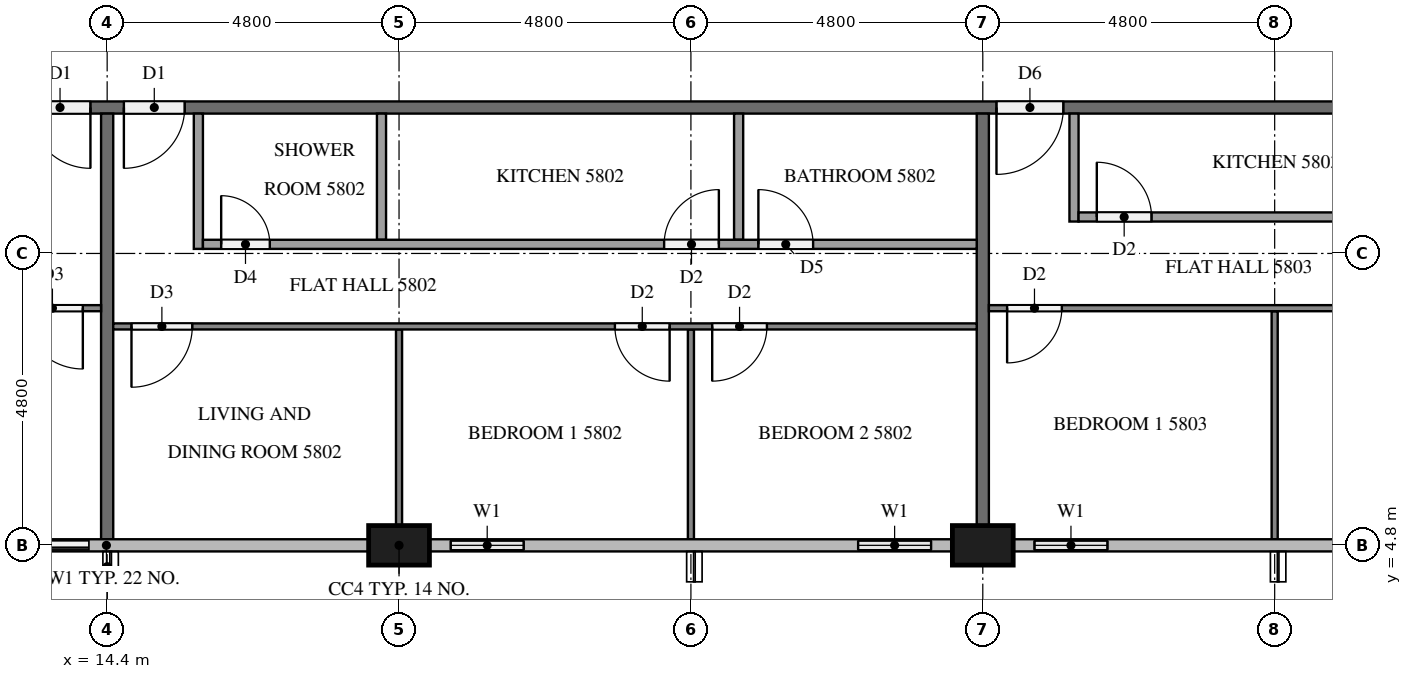
"""IFC4 building model, lengths in metres.
Left out: names, types, materials, properties, quantities, classifications, styles, units other than length and angle.
Written with IfcOpenShell. Run it as: python <this file> out.ifc"""

import sys

from ifc_helpers import new_model, si_unit, direction, frame, frame_2d, origin, origin_2d, place, context, subcontext, project, spatial, rectangle, extrude, element, fill, save


model = new_model("IFC4")
c1 = context("Model", 3, precision=1e-05, world=origin(), true_north=direction((0.0, 1.0)))
c2 = subcontext(c1, "Body", "Model", "MODEL_VIEW")
j1 = project(units=[si_unit("LENGTHUNIT", "METRE"), si_unit("PLANEANGLEUNIT", "RADIAN")], contexts=[c1])
p1 = place(None, origin())
s1 = spatial("IfcSite", under=j1, at=p1, CompositionType="ELEMENT")
p2 = place(p1, origin())
s2 = spatial("IfcBuilding", under=s1, at=p2, CompositionType="ELEMENT")
p3 = place(p2, frame((0.0, 0.0, 222.8)))
s3 = spatial("IfcBuildingStorey", under=s2, at=p3, CompositionType="ELEMENT", Elevation=222.8)
for number, where, z_axis, x_axis in (
    (1, (19.2, 4.8, 0.0), (0.0, 0.0, 1.0), (1.0, 0.0, 0.0)),
    (2, (28.8, 4.8, 0.0), (0.0, 0.0, 1.0), (1.0, 0.0, 0.0)),
):
    element("IfcColumn", number, at=place(p3, frame(where, z_axis=z_axis, x_axis=x_axis)), inside=s3, PredefinedType="COLUMN", context=c2, shape_type="SweptSolid", body=[
        extrude(rectangle(XDim=1.0, YDim=0.65, at=origin_2d()), origin(), (0.0, 0.0, 1.0), 3.2),
    ])
p4 = place(p3, frame((12.0, 4.8, 0.0), z_axis=(0.0, 0.0, 1.0), x_axis=(1.0, 0.0, 0.0)))
e3 = element("IfcWall", 3, at=p4, inside=s3, PredefinedType="SOLIDWALL", context=c2, shape_type="SweptSolid", body=[
    extrude(rectangle(XDim=2.4, YDim=0.15, at=frame_2d((1.2, 0.0))), origin(), (0.0, 0.0, 1.0), 3.2),
])
p5 = place(p4, frame((0.3, 0.0, 0.0)))
e4 = element("IfcOpeningElement", 4, at=p5, cuts=e3, PredefinedType="OPENING", context=c2, shape_type="SweptSolid", body=[
    extrude(rectangle(XDim=1.8, YDim=2.4, at=frame_2d((0.9, 1.2))), frame((0.0, 0.085, 0.0), z_axis=(0.0, -1.0, 0.0), x_axis=(1.0, 0.0, 0.0)), (0.0, 0.0, 1.0), 0.17),
])
p6 = place(p3, frame((19.7, 4.8, 0.0), z_axis=(0.0, 0.0, 1.0), x_axis=(1.0, 0.0, 0.0)))
e5 = element("IfcWall", 5, at=p6, inside=s3, PredefinedType="SOLIDWALL", context=c2, shape_type="SweptSolid", body=[
    extrude(rectangle(XDim=1.9, YDim=0.15, at=frame_2d((0.95, 0.0))), origin(), (0.0, 0.0, 1.0), 3.2),
])
p7 = place(p6, frame((0.35, 0.0, 0.9)))
e6 = element("IfcOpeningElement", 6, at=p7, cuts=e5, PredefinedType="OPENING", context=c2, shape_type="SweptSolid", body=[
    extrude(rectangle(XDim=1.2, YDim=1.4, at=frame_2d((0.6, 0.7))), frame((0.0, 0.085, 0.0), z_axis=(0.0, -1.0, 0.0), x_axis=(1.0, 0.0, 0.0)), (0.0, 0.0, 1.0), 0.17),
])
p8 = place(p3, frame((26.4, 4.8, 0.0), z_axis=(0.0, 0.0, 1.0), x_axis=(1.0, 0.0, 0.0)))
e7 = element("IfcWall", 7, at=p8, inside=s3, PredefinedType="SOLIDWALL", context=c2, shape_type="SweptSolid", body=[
    extrude(rectangle(XDim=1.9, YDim=0.15, at=frame_2d((0.95, 0.0))), origin(), (0.0, 0.0, 1.0), 3.2),
])
p9 = place(p8, frame((0.35, 0.0, 0.9)))
e8 = element("IfcOpeningElement", 8, at=p9, cuts=e7, PredefinedType="OPENING", context=c2, shape_type="SweptSolid", body=[
    extrude(rectangle(XDim=1.2, YDim=1.4, at=frame_2d((0.6, 0.7))), frame((0.0, 0.085, 0.0), z_axis=(0.0, -1.0, 0.0), x_axis=(1.0, 0.0, 0.0)), (0.0, 0.0, 1.0), 0.17),
])
p10 = place(p3, frame((29.3, 4.8, 0.0), z_axis=(0.0, 0.0, 1.0), x_axis=(1.0, 0.0, 0.0)))
e9 = element("IfcWall", 9, at=p10, inside=s3, PredefinedType="SOLIDWALL", context=c2, shape_type="SweptSolid", body=[
    extrude(rectangle(XDim=1.9, YDim=0.15, at=frame_2d((0.95, 0.0))), origin(), (0.0, 0.0, 1.0), 3.2),
])
p11 = place(p10, frame((0.35, 0.0, 0.9)))
e10 = element("IfcOpeningElement", 10, at=p11, cuts=e9, PredefinedType="OPENING", context=c2, shape_type="SweptSolid", body=[
    extrude(rectangle(XDim=1.2, YDim=1.4, at=frame_2d((0.6, 0.7))), frame((0.0, 0.085, 0.0), z_axis=(0.0, -1.0, 0.0), x_axis=(1.0, 0.0, 0.0)), (0.0, 0.0, 1.0), 0.17),
])
p12 = place(p3, frame((50.5, 12.0, 0.0), z_axis=(0.0, 0.0, 1.0), x_axis=(-1.0, 0.0, 0.0)))
e11 = element("IfcWall", 11, at=p12, inside=s3, PredefinedType="PARTITIONING", context=c2, shape_type="SweptSolid", body=[
    extrude(rectangle(XDim=38.6, YDim=0.2, at=frame_2d((19.3, 0.0))), origin(), (0.0, 0.0, 1.0), 3.2),
])
p13 = place(p12, frame((36.375, 0.0, 0.0)))
e12 = element("IfcOpeningElement", 12, at=p13, cuts=e11, PredefinedType="OPENING", context=c2, shape_type="SweptSolid", body=[
    extrude(rectangle(XDim=1.0, YDim=2.1, at=frame_2d((0.5, 1.05))), frame((0.0, 0.11, 0.0), z_axis=(0.0, -1.0, 0.0), x_axis=(1.0, 0.0, 0.0)), (0.0, 0.0, 1.0), 0.22),
])
p14 = place(p12, frame((34.825, 0.0, 0.0)))
e13 = element("IfcOpeningElement", 13, at=p14, cuts=e11, PredefinedType="OPENING", context=c2, shape_type="SweptSolid", body=[
    extrude(rectangle(XDim=1.0, YDim=2.1, at=frame_2d((0.5, 1.05))), frame((0.0, 0.11, 0.0), z_axis=(0.0, -1.0, 0.0), x_axis=(1.0, 0.0, 0.0)), (0.0, 0.0, 1.0), 0.22),
])
p15 = place(p12, frame((20.375, 0.0, 0.0)))
e14 = element("IfcOpeningElement", 14, at=p15, cuts=e11, PredefinedType="OPENING", context=c2, shape_type="SweptSolid", body=[
    extrude(rectangle(XDim=1.1, YDim=2.1, at=frame_2d((0.55, 1.05))), frame((0.0, 0.11, 0.0), z_axis=(0.0, -1.0, 0.0), x_axis=(1.0, 0.0, 0.0)), (0.0, 0.0, 1.0), 0.22),
])
p16 = place(p12, frame((1.225, 0.0, 0.0)))
e15 = element("IfcOpeningElement", 15, at=p16, cuts=e11, PredefinedType="OPENING", context=c2, shape_type="SweptSolid", body=[
    extrude(rectangle(XDim=1.0, YDim=2.1, at=frame_2d((0.5, 1.05))), frame((0.0, 0.11, 0.0), z_axis=(0.0, -1.0, 0.0), x_axis=(1.0, 0.0, 0.0)), (0.0, 0.0, 1.0), 0.22),
])
p17 = place(p3, frame((14.4, 11.9, 0.0), z_axis=(0.0, 0.0, 1.0), x_axis=(0.0, -1.0, 0.0)))
e16 = element("IfcWall", 16, at=p17, inside=s3, PredefinedType="PARTITIONING", context=c2, shape_type="SweptSolid", body=[
    extrude(rectangle(XDim=7.0, YDim=0.2, at=frame_2d((3.5, 0.0))), origin(), (0.0, 0.0, 1.0), 3.2),
])
p18 = place(p3, frame((28.8, 11.9, 0.0), z_axis=(0.0, 0.0, 1.0), x_axis=(0.0, -1.0, 0.0)))
e17 = element("IfcWall", 17, at=p18, inside=s3, PredefinedType="PARTITIONING", context=c2, shape_type="SweptSolid", body=[
    extrude(rectangle(XDim=6.775, YDim=0.2, at=frame_2d((3.387, 0.0))), origin(), (0.0, 0.0, 1.0), 3.2),
])
p19 = place(p3, frame((14.3, 8.7, 0.0), z_axis=(0.0, 0.0, 1.0), x_axis=(-1.0, 0.0, 0.0)))
e18 = element("IfcWall", 18, at=p19, inside=s3, PredefinedType="PARTITIONING", context=c2, shape_type="SweptSolid", body=[
    extrude(rectangle(XDim=9.159, YDim=0.1, at=frame_2d((4.58, 0.0))), origin(), (0.0, 0.0, 1.0), 3.2),
])
p20 = place(p19, frame((0.3, 0.0, 0.0)))
e19 = element("IfcOpeningElement", 19, at=p20, cuts=e18, PredefinedType="OPENING", context=c2, shape_type="SweptSolid", body=[
    extrude(rectangle(XDim=1.0, YDim=2.1, at=frame_2d((0.5, 1.05))), frame((0.0, 0.06, 0.0), z_axis=(0.0, -1.0, 0.0), x_axis=(1.0, 0.0, 0.0)), (0.0, 0.0, 1.0), 0.12),
])
p21 = place(p19, frame((7.959, 0.0, 0.0)))
e20 = element("IfcOpeningElement", 20, at=p21, cuts=e18, PredefinedType="OPENING", context=c2, shape_type="SweptSolid", body=[
    extrude(rectangle(XDim=0.9, YDim=2.1, at=frame_2d((0.45, 1.05))), frame((0.0, 0.06, 0.0), z_axis=(0.0, -1.0, 0.0), x_axis=(1.0, 0.0, 0.0)), (0.0, 0.0, 1.0), 0.12),
])
p22 = place(p3, frame((19.2, 8.35, 0.0), z_axis=(0.0, 0.0, 1.0), x_axis=(0.0, -1.0, 0.0)))
e21 = element("IfcWall", 21, at=p22, inside=s3, PredefinedType="PARTITIONING", context=c2, shape_type="SweptSolid", body=[
    extrude(rectangle(XDim=3.225, YDim=0.1, at=frame_2d((1.613, 0.0))), origin(), (0.0, 0.0, 1.0), 3.2),
])
p23 = place(p3, frame((24.0, 8.35, 0.0), z_axis=(0.0, 0.0, 1.0), x_axis=(0.0, -1.0, 0.0)))
e22 = element("IfcWall", 22, at=p23, inside=s3, PredefinedType="PARTITIONING", context=c2, shape_type="SweptSolid", body=[
    extrude(rectangle(XDim=3.45, YDim=0.1, at=frame_2d((1.725, 0.0))), origin(), (0.0, 0.0, 1.0), 3.2),
])
p24 = place(p3, frame((28.7, 8.4, 0.0), z_axis=(0.0, 0.0, 1.0), x_axis=(-1.0, 0.0, 0.0)))
e23 = element("IfcWall", 23, at=p24, inside=s3, PredefinedType="PARTITIONING", context=c2, shape_type="SweptSolid", body=[
    extrude(rectangle(XDim=14.2, YDim=0.1, at=frame_2d((7.1, 0.0))), origin(), (0.0, 0.0, 1.0), 3.2),
])
p25 = place(p24, frame((12.9, 0.0, 0.0)))
e24 = element("IfcOpeningElement", 24, at=p25, cuts=e23, PredefinedType="OPENING", context=c2, shape_type="SweptSolid", body=[
    extrude(rectangle(XDim=1.0, YDim=2.1, at=frame_2d((0.5, 1.05))), frame((0.0, 0.06, 0.0), z_axis=(0.0, -1.0, 0.0), x_axis=(1.0, 0.0, 0.0)), (0.0, 0.0, 1.0), 0.12),
])
p26 = place(p24, frame((5.05, 0.0, 0.0)))
e25 = element("IfcOpeningElement", 25, at=p26, cuts=e23, PredefinedType="OPENING", context=c2, shape_type="SweptSolid", body=[
    extrude(rectangle(XDim=0.9, YDim=2.1, at=frame_2d((0.45, 1.05))), frame((0.0, 0.06, 0.0), z_axis=(0.0, -1.0, 0.0), x_axis=(1.0, 0.0, 0.0)), (0.0, 0.0, 1.0), 0.12),
])
p27 = place(p24, frame((3.45, 0.0, 0.0)))
e26 = element("IfcOpeningElement", 26, at=p27, cuts=e23, PredefinedType="OPENING", context=c2, shape_type="SweptSolid", body=[
    extrude(rectangle(XDim=0.9, YDim=2.1, at=frame_2d((0.45, 1.05))), frame((0.0, 0.06, 0.0), z_axis=(0.0, -1.0, 0.0), x_axis=(1.0, 0.0, 0.0)), (0.0, 0.0, 1.0), 0.12),
])
for number, where, z_axis, x_axis in (
    (27, (18.912, 11.9, 0.0), (0.0, 0.0, 1.0), (0.0, -1.0, 0.0)),
    (28, (24.785, 11.9, 0.0), (0.0, 0.0, 1.0), (0.0, -1.0, 0.0)),
):
    element("IfcWall", number, at=place(p3, frame(where, z_axis=z_axis, x_axis=x_axis)), inside=s3, PredefinedType="PARTITIONING", context=c2, shape_type="SweptSolid", body=[
        extrude(rectangle(XDim=2.075, YDim=0.15, at=frame_2d((1.038, 0.0))), origin(), (0.0, 0.0, 1.0), 3.2),
    ])
p28 = place(p3, frame((15.9, 11.9, 0.0), z_axis=(0.0, 0.0, 1.0), x_axis=(0.0, -1.0, 0.0)))
e29 = element("IfcWall", 29, at=p28, inside=s3, PredefinedType="PARTITIONING", context=c2, shape_type="SweptSolid", body=[
    extrude(rectangle(XDim=2.225, YDim=0.15, at=frame_2d((1.112, 0.0))), origin(), (0.0, 0.0, 1.0), 3.2),
])
p29 = place(p3, frame((15.975, 9.75, 0.0), z_axis=(0.0, 0.0, 1.0), x_axis=(1.0, 0.0, 0.0)))
e30 = element("IfcWall", 30, at=p29, inside=s3, PredefinedType="PARTITIONING", context=c2, shape_type="SweptSolid", body=[
    extrude(rectangle(XDim=12.725, YDim=0.15, at=frame_2d((6.362, 0.0))), origin(), (0.0, 0.0, 1.0), 3.2),
])
p30 = place(p29, frame((0.3, 0.0, 0.0)))
e31 = element("IfcOpeningElement", 31, at=p30, cuts=e30, PredefinedType="OPENING", context=c2, shape_type="SweptSolid", body=[
    extrude(rectangle(XDim=0.8, YDim=2.1, at=frame_2d((0.4, 1.05))), frame((0.0, 0.085, 0.0), z_axis=(0.0, -1.0, 0.0), x_axis=(1.0, 0.0, 0.0)), (0.0, 0.0, 1.0), 0.17),
])
p31 = place(p29, frame((7.585, 0.0, 0.0)))
e32 = element("IfcOpeningElement", 32, at=p31, cuts=e30, PredefinedType="OPENING", context=c2, shape_type="SweptSolid", body=[
    extrude(rectangle(XDim=0.9, YDim=2.1, at=frame_2d((0.45, 1.05))), frame((0.0, 0.085, 0.0), z_axis=(0.0, -1.0, 0.0), x_axis=(1.0, 0.0, 0.0)), (0.0, 0.0, 1.0), 0.17),
])
p32 = place(p29, frame((9.135, 0.0, 0.0)))
e33 = element("IfcOpeningElement", 33, at=p32, cuts=e30, PredefinedType="OPENING", context=c2, shape_type="SweptSolid", body=[
    extrude(rectangle(XDim=0.9, YDim=2.1, at=frame_2d((0.45, 1.05))), frame((0.0, 0.085, 0.0), z_axis=(0.0, -1.0, 0.0), x_axis=(1.0, 0.0, 0.0)), (0.0, 0.0, 1.0), 0.17),
])
p33 = place(p3, frame((33.6, 8.65, 0.0), z_axis=(0.0, 0.0, 1.0), x_axis=(0.0, -1.0, 0.0)))
e34 = element("IfcWall", 34, at=p33, inside=s3, PredefinedType="PARTITIONING", context=c2, shape_type="SweptSolid", body=[
    extrude(rectangle(XDim=3.75, YDim=0.1, at=frame_2d((1.875, 0.0))), origin(), (0.0, 0.0, 1.0), 3.2),
])
p34 = place(p3, frame((47.9, 8.7, 0.0), z_axis=(0.0, 0.0, 1.0), x_axis=(-1.0, 0.0, 0.0)))
e35 = element("IfcWall", 35, at=p34, inside=s3, PredefinedType="PARTITIONING", context=c2, shape_type="SweptSolid", body=[
    extrude(rectangle(XDim=19.0, YDim=0.1, at=frame_2d((9.5, 0.0))), origin(), (0.0, 0.0, 1.0), 3.2),
])
p35 = place(p34, frame((17.8, 0.0, 0.0)))
e36 = element("IfcOpeningElement", 36, at=p35, cuts=e35, PredefinedType="OPENING", context=c2, shape_type="SweptSolid", body=[
    extrude(rectangle(XDim=0.9, YDim=2.1, at=frame_2d((0.45, 1.05))), frame((0.0, 0.06, 0.0), z_axis=(0.0, -1.0, 0.0), x_axis=(1.0, 0.0, 0.0)), (0.0, 0.0, 1.0), 0.12),
])
p36 = place(p34, frame((9.85, 0.0, 0.0)))
e37 = element("IfcOpeningElement", 37, at=p36, cuts=e35, PredefinedType="OPENING", context=c2, shape_type="SweptSolid", body=[
    extrude(rectangle(XDim=0.9, YDim=2.1, at=frame_2d((0.45, 1.05))), frame((0.0, 0.06, 0.0), z_axis=(0.0, -1.0, 0.0), x_axis=(1.0, 0.0, 0.0)), (0.0, 0.0, 1.0), 0.12),
])
p37 = place(p34, frame((8.25, 0.0, 0.0)))
e38 = element("IfcOpeningElement", 38, at=p37, cuts=e35, PredefinedType="OPENING", context=c2, shape_type="SweptSolid", body=[
    extrude(rectangle(XDim=0.9, YDim=2.1, at=frame_2d((0.45, 1.05))), frame((0.0, 0.06, 0.0), z_axis=(0.0, -1.0, 0.0), x_axis=(1.0, 0.0, 0.0)), (0.0, 0.0, 1.0), 0.12),
])
p38 = place(p34, frame((0.3, 0.0, 0.0)))
e39 = element("IfcOpeningElement", 39, at=p38, cuts=e35, PredefinedType="OPENING", context=c2, shape_type="SweptSolid", body=[
    extrude(rectangle(XDim=1.0, YDim=2.1, at=frame_2d((0.5, 1.05))), frame((0.0, 0.06, 0.0), z_axis=(0.0, -1.0, 0.0), x_axis=(1.0, 0.0, 0.0)), (0.0, 0.0, 1.0), 0.12),
])
p39 = place(p3, frame((30.3, 11.9, 0.0), z_axis=(0.0, 0.0, 1.0), x_axis=(0.0, -1.0, 0.0)))
e40 = element("IfcWall", 40, at=p39, inside=s3, PredefinedType="PARTITIONING", context=c2, shape_type="SweptSolid", body=[
    extrude(rectangle(XDim=1.775, YDim=0.15, at=frame_2d((0.887, 0.0))), origin(), (0.0, 0.0, 1.0), 3.2),
])
p40 = place(p3, frame((30.375, 10.2, 0.0), z_axis=(0.0, 0.0, 1.0), x_axis=(1.0, 0.0, 0.0)))
e41 = element("IfcWall", 41, at=p40, inside=s3, PredefinedType="PARTITIONING", context=c2, shape_type="SweptSolid", body=[
    extrude(rectangle(XDim=17.525, YDim=0.15, at=frame_2d((8.762, 0.0))), origin(), (0.0, 0.0, 1.0), 3.2),
])
p41 = place(p40, frame((0.3, 0.0, 0.0)))
e42 = element("IfcOpeningElement", 42, at=p41, cuts=e41, PredefinedType="OPENING", context=c2, shape_type="SweptSolid", body=[
    extrude(rectangle(XDim=0.9, YDim=2.1, at=frame_2d((0.45, 1.05))), frame((0.0, 0.085, 0.0), z_axis=(0.0, -1.0, 0.0), x_axis=(1.0, 0.0, 0.0)), (0.0, 0.0, 1.0), 0.17),
])
p42 = place(p40, frame((8.733, 0.0, 0.0)))
e43 = element("IfcOpeningElement", 43, at=p42, cuts=e41, PredefinedType="OPENING", context=c2, shape_type="SweptSolid", body=[
    extrude(rectangle(XDim=0.8, YDim=2.1, at=frame_2d((0.4, 1.05))), frame((0.0, 0.085, 0.0), z_axis=(0.0, -1.0, 0.0), x_axis=(1.0, 0.0, 0.0)), (0.0, 0.0, 1.0), 0.17),
])
p43 = place(p40, frame((10.183, 0.0, 0.0)))
e44 = element("IfcOpeningElement", 44, at=p43, cuts=e41, PredefinedType="OPENING", context=c2, shape_type="SweptSolid", body=[
    extrude(rectangle(XDim=0.8, YDim=2.1, at=frame_2d((0.4, 1.05))), frame((0.0, 0.085, 0.0), z_axis=(0.0, -1.0, 0.0), x_axis=(1.0, 0.0, 0.0)), (0.0, 0.0, 1.0), 0.17),
])
p44 = place(p40, frame((16.275, 0.0, 0.0)))
e45 = element("IfcOpeningElement", 45, at=p44, cuts=e41, PredefinedType="OPENING", context=c2, shape_type="SweptSolid", body=[
    extrude(rectangle(XDim=0.9, YDim=2.1, at=frame_2d((0.45, 1.05))), frame((0.0, 0.085, 0.0), z_axis=(0.0, -1.0, 0.0), x_axis=(1.0, 0.0, 0.0)), (0.0, 0.0, 1.0), 0.17),
])
p45 = place(p5, origin())
e46 = element("IfcDoor", 46, at=p45, inside=s3, OperationType="SLIDING_TO_LEFT", PredefinedType="DOOR", context=c2, shape_type="SweptSolid", body=[
    extrude(rectangle(XDim=1.8, YDim=2.4, at=frame_2d((0.9, 1.2))), frame((0.0, 0.025, 0.0), z_axis=(0.0, -1.0, 0.0), x_axis=(1.0, 0.0, 0.0)), (0.0, 0.0, 1.0), 0.05),
])
fill(e4, e46)
p46 = place(p7, origin())
e47 = element("IfcWindow", 47, at=p46, inside=s3, PartitioningType="SINGLE_PANEL", PredefinedType="WINDOW", context=c2, shape_type="SweptSolid", body=[
    extrude(rectangle(XDim=1.2, YDim=1.4, at=frame_2d((0.6, 0.7))), frame((0.0, 0.03, 0.0), z_axis=(0.0, -1.0, 0.0), x_axis=(1.0, 0.0, 0.0)), (0.0, 0.0, 1.0), 0.06),
])
fill(e6, e47)
p47 = place(p9, origin())
e48 = element("IfcWindow", 48, at=p47, inside=s3, PartitioningType="SINGLE_PANEL", PredefinedType="WINDOW", context=c2, shape_type="SweptSolid", body=[
    extrude(rectangle(XDim=1.2, YDim=1.4, at=frame_2d((0.6, 0.7))), frame((0.0, 0.03, 0.0), z_axis=(0.0, -1.0, 0.0), x_axis=(1.0, 0.0, 0.0)), (0.0, 0.0, 1.0), 0.06),
])
fill(e8, e48)
p48 = place(p11, origin())
e49 = element("IfcWindow", 49, at=p48, inside=s3, PartitioningType="SINGLE_PANEL", PredefinedType="WINDOW", context=c2, shape_type="SweptSolid", body=[
    extrude(rectangle(XDim=1.2, YDim=1.4, at=frame_2d((0.6, 0.7))), frame((0.0, 0.03, 0.0), z_axis=(0.0, -1.0, 0.0), x_axis=(1.0, 0.0, 0.0)), (0.0, 0.0, 1.0), 0.06),
])
fill(e10, e49)
p49 = place(p13, origin())
e50 = element("IfcDoor", 50, at=p49, inside=s3, OperationType="SINGLE_SWING_LEFT", PredefinedType="DOOR", context=c2, shape_type="SweptSolid", body=[
    extrude(rectangle(XDim=1.0, YDim=2.1, at=frame_2d((0.5, 1.05))), frame((0.0, 0.025, 0.0), z_axis=(0.0, -1.0, 0.0), x_axis=(1.0, 0.0, 0.0)), (0.0, 0.0, 1.0), 0.05),
])
fill(e12, e50)
p50 = place(p14, origin())
e51 = element("IfcDoor", 51, at=p50, inside=s3, OperationType="SINGLE_SWING_RIGHT", PredefinedType="DOOR", context=c2, shape_type="SweptSolid", body=[
    extrude(rectangle(XDim=1.0, YDim=2.1, at=frame_2d((0.5, 1.05))), frame((0.0, 0.025, 0.0), z_axis=(0.0, -1.0, 0.0), x_axis=(1.0, 0.0, 0.0)), (0.0, 0.0, 1.0), 0.05),
])
fill(e13, e51)
p51 = place(p15, origin())
e52 = element("IfcDoor", 52, at=p51, inside=s3, OperationType="SINGLE_SWING_RIGHT", PredefinedType="DOOR", context=c2, shape_type="SweptSolid", body=[
    extrude(rectangle(XDim=1.1, YDim=2.1, at=frame_2d((0.55, 1.05))), frame((0.0, 0.025, 0.0), z_axis=(0.0, -1.0, 0.0), x_axis=(1.0, 0.0, 0.0)), (0.0, 0.0, 1.0), 0.05),
])
fill(e14, e52)
p52 = place(p20, origin())
e53 = element("IfcDoor", 53, at=p52, inside=s3, OperationType="SINGLE_SWING_LEFT", PredefinedType="DOOR", context=c2, shape_type="SweptSolid", body=[
    extrude(rectangle(XDim=1.0, YDim=2.1, at=frame_2d((0.5, 1.05))), frame((0.0, 0.025, 0.0), z_axis=(0.0, -1.0, 0.0), x_axis=(1.0, 0.0, 0.0)), (0.0, 0.0, 1.0), 0.05),
])
fill(e19, e53)
p53 = place(p25, origin())
e54 = element("IfcDoor", 54, at=p53, inside=s3, OperationType="SINGLE_SWING_RIGHT", PredefinedType="DOOR", context=c2, shape_type="SweptSolid", body=[
    extrude(rectangle(XDim=1.0, YDim=2.1, at=frame_2d((0.5, 1.05))), frame((0.0, 0.025, 0.0), z_axis=(0.0, -1.0, 0.0), x_axis=(1.0, 0.0, 0.0)), (0.0, 0.0, 1.0), 0.05),
])
fill(e24, e54)
p54 = place(p26, origin())
e55 = element("IfcDoor", 55, at=p54, inside=s3, OperationType="SINGLE_SWING_LEFT", PredefinedType="DOOR", context=c2, shape_type="SweptSolid", body=[
    extrude(rectangle(XDim=0.9, YDim=2.1, at=frame_2d((0.45, 1.05))), frame((0.0, 0.025, 0.0), z_axis=(0.0, -1.0, 0.0), x_axis=(1.0, 0.0, 0.0)), (0.0, 0.0, 1.0), 0.05),
])
fill(e25, e55)
p55 = place(p27, origin())
e56 = element("IfcDoor", 56, at=p55, inside=s3, OperationType="SINGLE_SWING_RIGHT", PredefinedType="DOOR", context=c2, shape_type="SweptSolid", body=[
    extrude(rectangle(XDim=0.9, YDim=2.1, at=frame_2d((0.45, 1.05))), frame((0.0, 0.025, 0.0), z_axis=(0.0, -1.0, 0.0), x_axis=(1.0, 0.0, 0.0)), (0.0, 0.0, 1.0), 0.05),
])
fill(e26, e56)
p56 = place(p30, origin())
e57 = element("IfcDoor", 57, at=p56, inside=s3, OperationType="SINGLE_SWING_LEFT", PredefinedType="DOOR", context=c2, shape_type="SweptSolid", body=[
    extrude(rectangle(XDim=0.8, YDim=2.1, at=frame_2d((0.4, 1.05))), frame((0.0, 0.025, 0.0), z_axis=(0.0, -1.0, 0.0), x_axis=(1.0, 0.0, 0.0)), (0.0, 0.0, 1.0), 0.05),
])
fill(e31, e57)
p57 = place(p31, origin())
e58 = element("IfcDoor", 58, at=p57, inside=s3, OperationType="SINGLE_SWING_RIGHT", PredefinedType="DOOR", context=c2, shape_type="SweptSolid", body=[
    extrude(rectangle(XDim=0.9, YDim=2.1, at=frame_2d((0.45, 1.05))), frame((0.0, 0.025, 0.0), z_axis=(0.0, -1.0, 0.0), x_axis=(1.0, 0.0, 0.0)), (0.0, 0.0, 1.0), 0.05),
])
fill(e32, e58)
p58 = place(p32, origin())
e59 = element("IfcDoor", 59, at=p58, inside=s3, OperationType="SINGLE_SWING_LEFT", PredefinedType="DOOR", context=c2, shape_type="SweptSolid", body=[
    extrude(rectangle(XDim=0.9, YDim=2.1, at=frame_2d((0.45, 1.05))), frame((0.0, 0.025, 0.0), z_axis=(0.0, -1.0, 0.0), x_axis=(1.0, 0.0, 0.0)), (0.0, 0.0, 1.0), 0.05),
])
fill(e33, e59)
p59 = place(p35, origin())
e60 = element("IfcDoor", 60, at=p59, inside=s3, OperationType="SINGLE_SWING_RIGHT", PredefinedType="DOOR", context=c2, shape_type="SweptSolid", body=[
    extrude(rectangle(XDim=0.9, YDim=2.1, at=frame_2d((0.45, 1.05))), frame((0.0, 0.025, 0.0), z_axis=(0.0, -1.0, 0.0), x_axis=(1.0, 0.0, 0.0)), (0.0, 0.0, 1.0), 0.05),
])
fill(e36, e60)
p60 = place(p41, origin())
e61 = element("IfcDoor", 61, at=p60, inside=s3, OperationType="SINGLE_SWING_LEFT", PredefinedType="DOOR", context=c2, shape_type="SweptSolid", body=[
    extrude(rectangle(XDim=0.9, YDim=2.1, at=frame_2d((0.45, 1.05))), frame((0.0, 0.025, 0.0), z_axis=(0.0, -1.0, 0.0), x_axis=(1.0, 0.0, 0.0)), (0.0, 0.0, 1.0), 0.05),
])
fill(e42, e61)
save(model, sys.argv[1])
